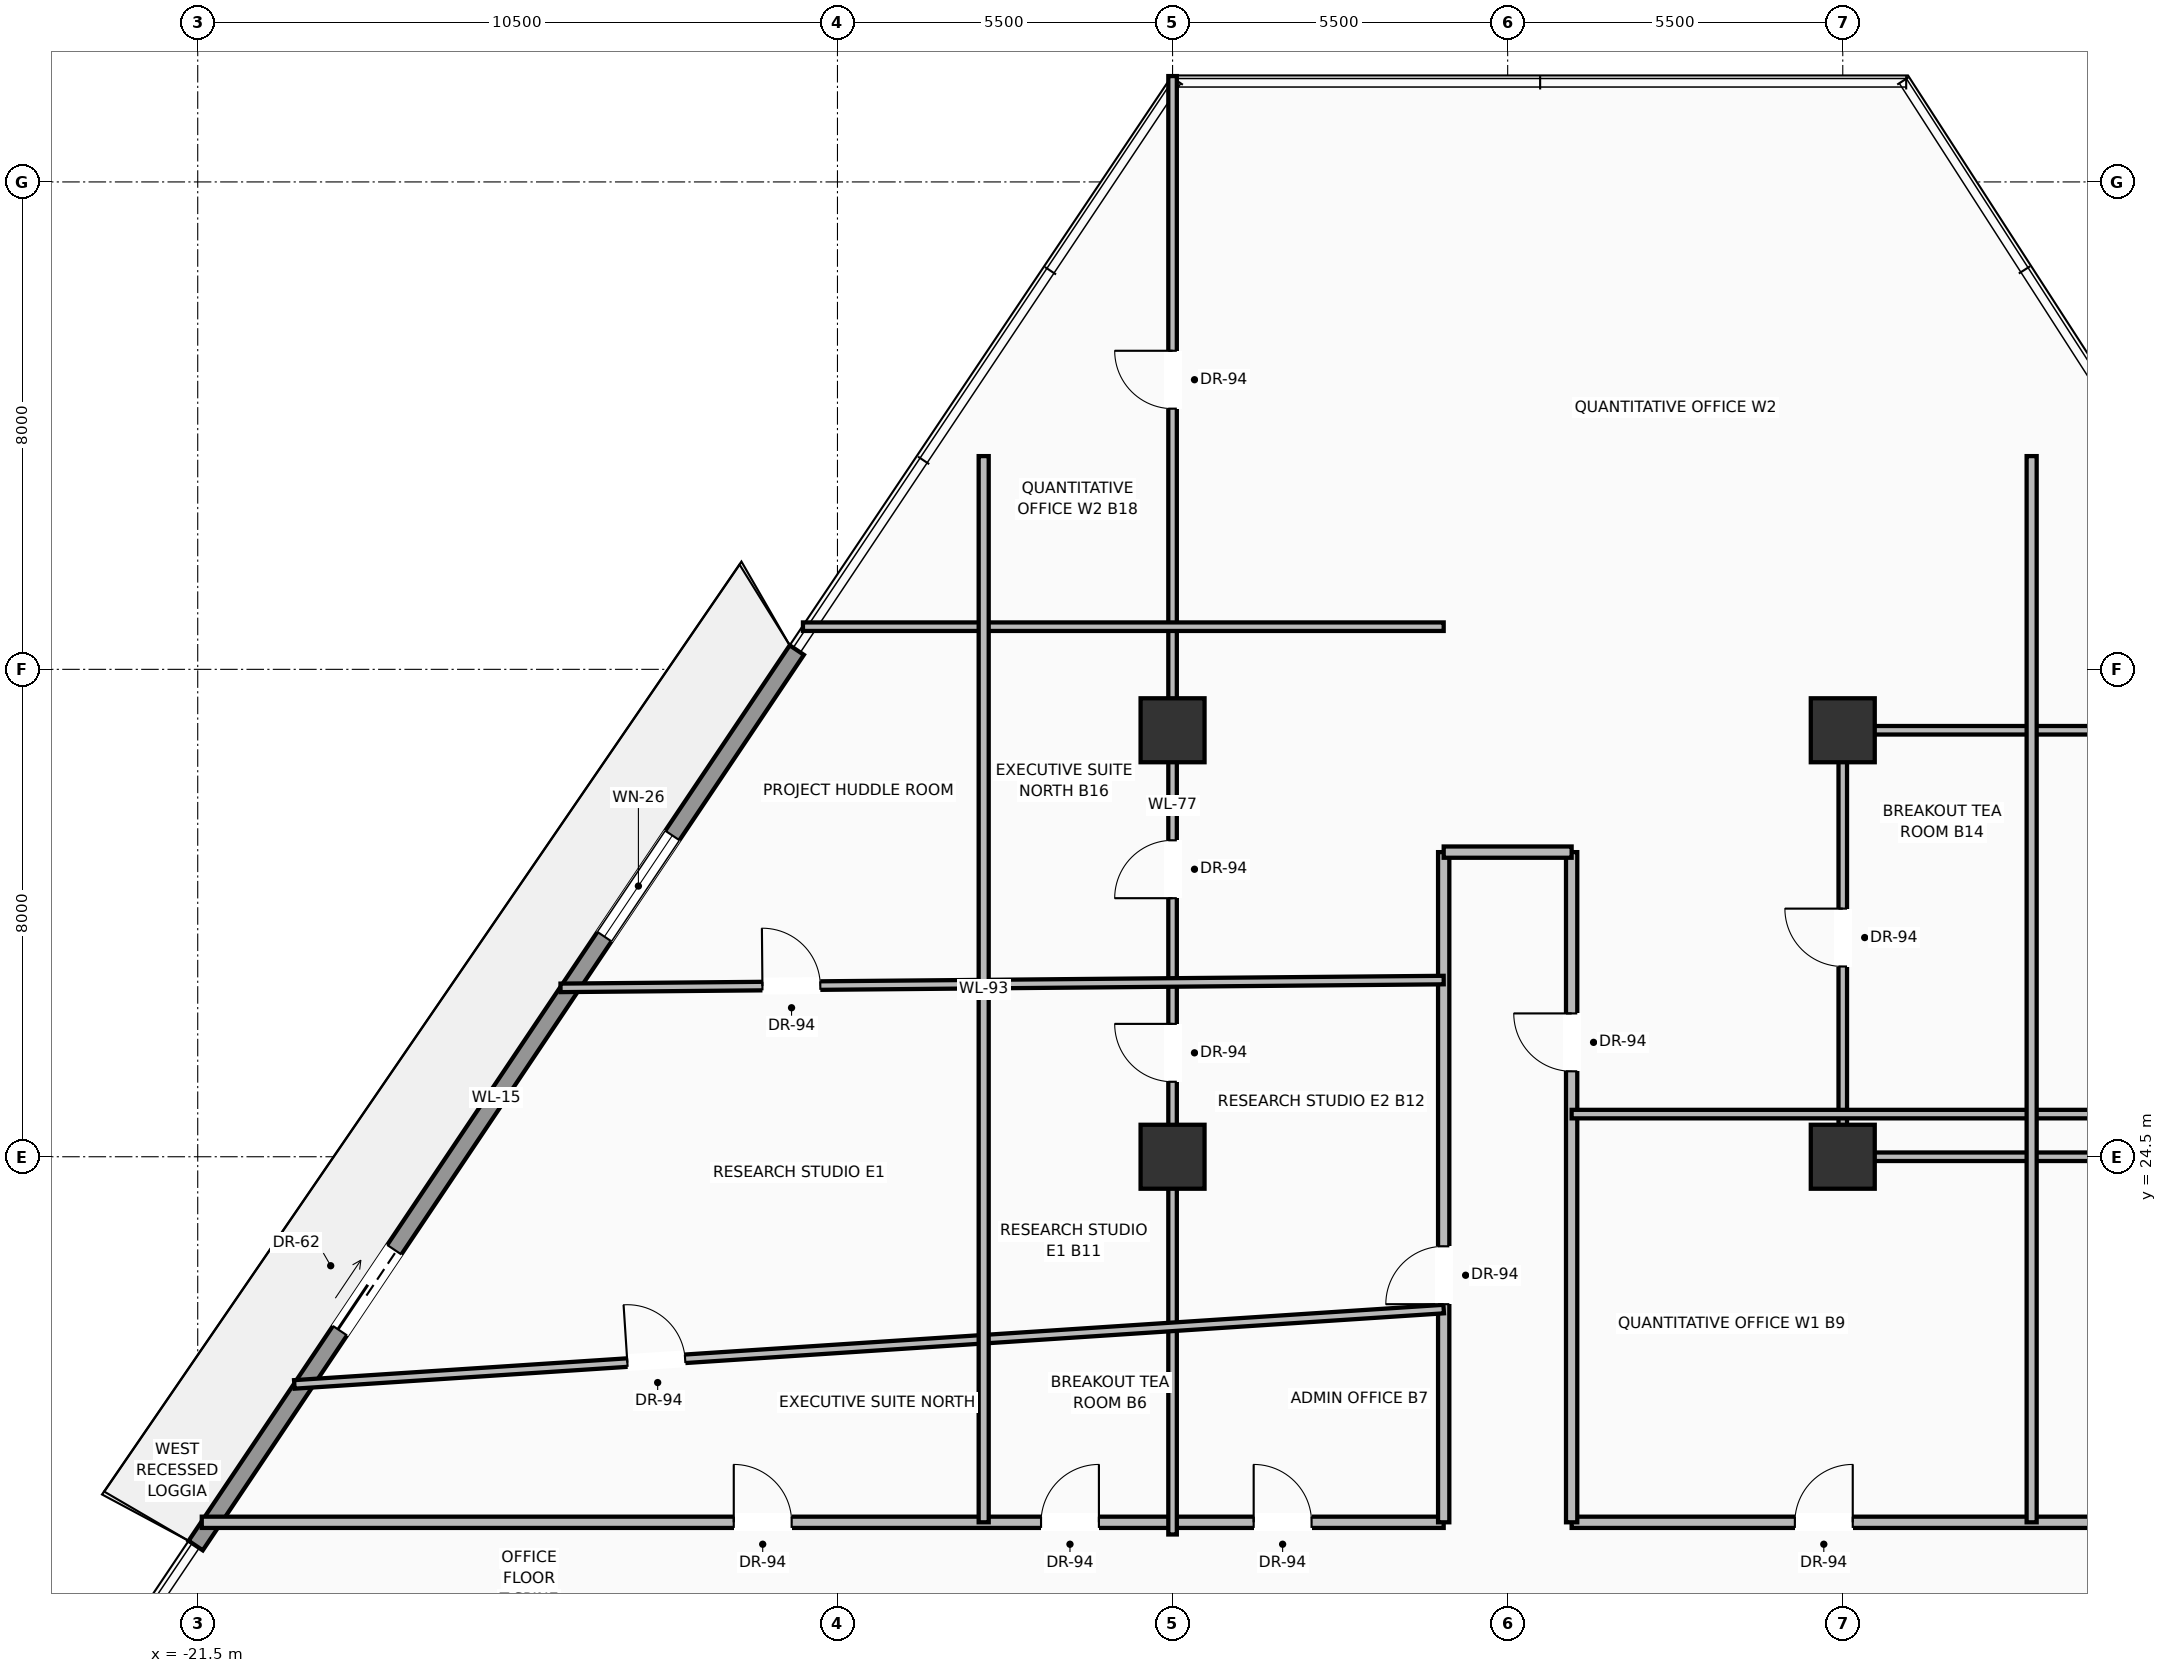
"""IFC4 building model, lengths in metres.
Left out: names, types, materials, properties, quantities, classifications, styles, units other than length and angle.
Written with IfcOpenShell. Run it as: python <this file> out.ifc"""

import sys

from ifc_helpers import new_model, si_unit, direction, frame, frame_2d, origin, origin_2d, place, context, subcontext, project, spatial, rectangle, extrude, source, transform, mapped, element, fill, save


model = new_model("IFC4")
c1 = context("Model", 3, precision=1e-05, world=origin(), true_north=direction((0.0, 1.0)))
c2 = subcontext(c1, "Body", "Model", "MODEL_VIEW")
j1 = project(units=[si_unit("LENGTHUNIT", "METRE"), si_unit("PLANEANGLEUNIT", "RADIAN")], contexts=[c1])
p1 = place(None, origin())
s1 = spatial("IfcSite", under=j1, at=p1, CompositionType="ELEMENT")
p2 = place(p1, origin())
s2 = spatial("IfcBuilding", under=s1, at=p2, CompositionType="ELEMENT")
p3 = place(p2, frame((0.0, 0.0, 98.8)))
s3 = spatial("IfcBuildingStorey", under=s2, at=p3, CompositionType="ELEMENT", Elevation=98.8)
m1 = source(origin(), c2, "Body", "SweptSolid", [
    extrude(rectangle(XDim=1.05, YDim=1.05, at=origin_2d()), origin(), (0.0, 0.0, 1.0), 3.7),
])
for number, where, z_axis, x_axis in (
    (1, (-5.5, 24.5, 0.0), (0.0, 0.0, 1.0), (1.0, 0.0, 0.0)),
    (2, (5.5, 24.5, 0.0), (0.0, 0.0, 1.0), (1.0, 0.0, 0.0)),
    (3, (-5.5, 31.5, 0.0), (0.0, 0.0, 1.0), (1.0, 0.0, 0.0)),
    (4, (5.5, 31.5, 0.0), (0.0, 0.0, 1.0), (1.0, 0.0, 0.0)),
):
    element("IfcColumn", number, at=place(p3, frame(where, z_axis=z_axis, x_axis=x_axis)), inside=s3, PredefinedType="COLUMN", context=c2, shape_type="MappedRepresentation", body=[
        mapped(m1, transform((0.0, 0.0, 0.0), scale=1.0)),
    ])
p4 = place(p3, frame((-21.533, 18.118, 0.0), z_axis=(0.0, 0.0, 1.0), x_axis=(0.55732309921, 0.830295708219, 0.0)))
e5 = element("IfcWall", 5, at=p4, inside=s3, PredefinedType="SOLIDWALL", context=c2, shape_type="SweptSolid", body=[
    extrude(rectangle(XDim=17.702, YDim=0.28, at=frame_2d((8.851, 0.0))), origin(), (0.0, 0.0, 1.0), 3.03),
])
p5 = place(p4, frame((4.249, 0.0, 0.0)))
e6 = element("IfcOpeningElement", 6, at=p5, cuts=e5, PredefinedType="OPENING", context=c2, shape_type="SweptSolid", body=[
    extrude(rectangle(XDim=1.6, YDim=2.35, at=frame_2d((0.8, 1.175))), frame((0.0, 0.15, 0.0), z_axis=(0.0, -1.0, 0.0), x_axis=(1.0, 0.0, 0.0)), (0.0, 0.0, 1.0), 0.3),
])
p6 = place(p4, frame((12.038, 0.0, 0.9)))
e7 = element("IfcOpeningElement", 7, at=p6, cuts=e5, PredefinedType="OPENING", context=c2, shape_type="SweptSolid", body=[
    extrude(rectangle(XDim=2.0, YDim=1.85, at=frame_2d((1.0, 0.925))), frame((0.0, 0.15, 0.0), z_axis=(0.0, -1.0, 0.0), x_axis=(1.0, 0.0, 0.0)), (0.0, 0.0, 1.0), 0.3),
])
p7 = place(p3, frame((-21.434, 18.5, 0.0), z_axis=(0.0, 0.0, 1.0), x_axis=(1.0, 0.0, 0.0)))
e8 = element("IfcWall", 8, at=p7, inside=s3, PredefinedType="PARTITIONING", context=c2, shape_type="SweptSolid", body=[
    extrude(rectangle(XDim=20.384, YDim=0.185, at=frame_2d((10.192, 0.0))), origin(), (0.0, 0.0, 1.0), 2.747),
])
p8 = place(p7, frame((8.732, 0.0, 0.0)))
e9 = element("IfcOpeningElement", 9, at=p8, cuts=e8, PredefinedType="OPENING", context=c2, shape_type="SweptSolid", body=[
    extrude(rectangle(XDim=0.95, YDim=2.2, at=frame_2d((0.475, 1.1))), frame((0.0, 0.103, 0.0), z_axis=(0.0, -1.0, 0.0), x_axis=(1.0, 0.0, 0.0)), (0.0, 0.0, 1.0), 0.205),
])
p9 = place(p7, frame((13.775, 0.0, 0.0)))
e10 = element("IfcOpeningElement", 10, at=p9, cuts=e8, PredefinedType="OPENING", context=c2, shape_type="SweptSolid", body=[
    extrude(rectangle(XDim=0.95, YDim=2.2, at=frame_2d((0.475, 1.1))), frame((0.0, 0.103, 0.0), z_axis=(0.0, -1.0, 0.0), x_axis=(1.0, 0.0, 0.0)), (0.0, 0.0, 1.0), 0.205),
])
p10 = place(p7, frame((17.265, 0.0, 0.0)))
e11 = element("IfcOpeningElement", 11, at=p10, cuts=e8, PredefinedType="OPENING", context=c2, shape_type="SweptSolid", body=[
    extrude(rectangle(XDim=0.95, YDim=2.2, at=frame_2d((0.475, 1.1))), frame((0.0, 0.103, 0.0), z_axis=(0.0, -1.0, 0.0), x_axis=(1.0, 0.0, 0.0)), (0.0, 0.0, 1.0), 0.205),
])
p11 = place(p3, frame((1.05, 18.5, 0.0), z_axis=(0.0, 0.0, 1.0), x_axis=(1.0, 0.0, 0.0)))
e12 = element("IfcWall", 12, at=p11, inside=s3, PredefinedType="PARTITIONING", context=c2, shape_type="SweptSolid", body=[
    extrude(rectangle(XDim=20.85, YDim=0.185, at=frame_2d((10.425, 0.0))), origin(), (0.0, 0.0, 1.0), 2.747),
])
p12 = place(p11, frame((10.959, 0.0, 0.0)))
e13 = element("IfcOpeningElement", 13, at=p12, cuts=e12, PredefinedType="OPENING", context=c2, shape_type="SweptSolid", body=[
    extrude(rectangle(XDim=0.95, YDim=2.2, at=frame_2d((0.475, 1.1))), frame((0.0, 0.103, 0.0), z_axis=(0.0, -1.0, 0.0), x_axis=(1.0, 0.0, 0.0)), (0.0, 0.0, 1.0), 0.205),
])
p13 = place(p11, frame((3.664, 0.0, 0.0)))
e14 = element("IfcOpeningElement", 14, at=p13, cuts=e12, PredefinedType="OPENING", context=c2, shape_type="SweptSolid", body=[
    extrude(rectangle(XDim=0.95, YDim=2.2, at=frame_2d((0.475, 1.1))), frame((0.0, 0.103, 0.0), z_axis=(0.0, -1.0, 0.0), x_axis=(1.0, 0.0, 0.0)), (0.0, 0.0, 1.0), 0.205),
])
p14 = place(p3, frame((-1.05, 18.5, 0.0), z_axis=(0.0, 0.0, 1.0), x_axis=(0.0, 1.0, 0.0)))
e15 = element("IfcWall", 15, at=p14, inside=s3, PredefinedType="PARTITIONING", context=c2, shape_type="SweptSolid", body=[
    extrude(rectangle(XDim=11.0, YDim=0.185, at=frame_2d((5.5, 0.0))), origin(), (0.0, 0.0, 1.0), 2.747),
])
p15 = place(p14, frame((3.58, 0.0, 0.0)))
e16 = element("IfcOpeningElement", 16, at=p15, cuts=e15, PredefinedType="OPENING", context=c2, shape_type="SweptSolid", body=[
    extrude(rectangle(XDim=0.95, YDim=2.2, at=frame_2d((0.475, 1.1))), frame((0.0, 0.103, 0.0), z_axis=(0.0, -1.0, 0.0), x_axis=(1.0, 0.0, 0.0)), (0.0, 0.0, 1.0), 0.205),
])
p16 = place(p3, frame((1.05, 18.5, 0.0), z_axis=(0.0, 0.0, 1.0), x_axis=(0.0, 1.0, 0.0)))
e17 = element("IfcWall", 17, at=p16, inside=s3, PredefinedType="PARTITIONING", context=c2, shape_type="SweptSolid", body=[
    extrude(rectangle(XDim=11.0, YDim=0.185, at=frame_2d((5.5, 0.0))), origin(), (0.0, 0.0, 1.0), 2.747),
])
p17 = place(p16, frame((7.403, 0.0, 0.0)))
e18 = element("IfcOpeningElement", 18, at=p17, cuts=e17, PredefinedType="OPENING", context=c2, shape_type="SweptSolid", body=[
    extrude(rectangle(XDim=0.95, YDim=2.2, at=frame_2d((0.475, 1.1))), frame((0.0, 0.103, 0.0), z_axis=(0.0, -1.0, 0.0), x_axis=(1.0, 0.0, 0.0)), (0.0, 0.0, 1.0), 0.205),
])
p18 = place(p3, frame((-1.05, 29.5, 0.0), z_axis=(0.0, 0.0, 1.0), x_axis=(1.0, 0.0, 0.0)))
e19 = element("IfcWall", 19, at=p18, inside=s3, PredefinedType="PARTITIONING", context=c2, shape_type="SweptSolid", body=[
    extrude(rectangle(XDim=2.1, YDim=0.185, at=frame_2d((1.05, 0.0))), origin(), (0.0, 0.0, 1.0), 3.442),
])
p19 = place(p3, frame((-5.5, 18.3, 0.0), z_axis=(0.0, 0.0, 1.0), x_axis=(0.0, 1.0, 0.0)))
e20 = element("IfcWall", 20, at=p19, inside=s3, PredefinedType="PARTITIONING", context=c2, shape_type="SweptSolid", body=[
    extrude(rectangle(XDim=23.938, YDim=0.14, at=frame_2d((11.969, 0.0))), origin(), (0.0, 0.0, 1.0), 2.747),
])
p20 = place(p19, frame((7.431, 0.0, 0.0)))
e21 = element("IfcOpeningElement", 21, at=p20, cuts=e20, PredefinedType="OPENING", context=c2, shape_type="SweptSolid", body=[
    extrude(rectangle(XDim=0.95, YDim=2.2, at=frame_2d((0.475, 1.1))), frame((0.0, 0.08, 0.0), z_axis=(0.0, -1.0, 0.0), x_axis=(1.0, 0.0, 0.0)), (0.0, 0.0, 1.0), 0.16),
])
p21 = place(p19, frame((10.444, 0.0, 0.0)))
e22 = element("IfcOpeningElement", 22, at=p21, cuts=e20, PredefinedType="OPENING", context=c2, shape_type="SweptSolid", body=[
    extrude(rectangle(XDim=0.95, YDim=2.2, at=frame_2d((0.475, 1.1))), frame((0.0, 0.08, 0.0), z_axis=(0.0, -1.0, 0.0), x_axis=(1.0, 0.0, 0.0)), (0.0, 0.0, 1.0), 0.16),
])
p22 = place(p19, frame((18.479, 0.0, 0.0)))
e23 = element("IfcOpeningElement", 23, at=p22, cuts=e20, PredefinedType="OPENING", context=c2, shape_type="SweptSolid", body=[
    extrude(rectangle(XDim=0.95, YDim=2.2, at=frame_2d((0.475, 1.1))), frame((0.0, 0.08, 0.0), z_axis=(0.0, -1.0, 0.0), x_axis=(1.0, 0.0, 0.0)), (0.0, 0.0, 1.0), 0.16),
])
p23 = place(p3, frame((5.5, 24.5, 0.0), z_axis=(0.0, 0.0, 1.0), x_axis=(1.0, 0.0, 0.0)))
e24 = element("IfcWall", 24, at=p23, inside=s3, PredefinedType="PARTITIONING", context=c2, shape_type="SweptSolid", body=[
    extrude(rectangle(XDim=12.524, YDim=0.14, at=frame_2d((6.262, 0.0))), origin(), (0.0, 0.0, 1.0), 2.747),
])
p24 = place(p3, frame((5.5, 24.5, 0.0), z_axis=(0.0, 0.0, 1.0), x_axis=(0.0, 1.0, 0.0)))
e25 = element("IfcWall", 25, at=p24, inside=s3, PredefinedType="PARTITIONING", context=c2, shape_type="SweptSolid", body=[
    extrude(rectangle(XDim=7.0, YDim=0.14, at=frame_2d((3.5, 0.0))), origin(), (0.0, 0.0, 1.0), 2.747),
])
p25 = place(p24, frame((3.123, 0.0, 0.0)))
e26 = element("IfcOpeningElement", 26, at=p25, cuts=e25, PredefinedType="OPENING", context=c2, shape_type="SweptSolid", body=[
    extrude(rectangle(XDim=0.95, YDim=2.2, at=frame_2d((0.475, 1.1))), frame((0.0, 0.08, 0.0), z_axis=(0.0, -1.0, 0.0), x_axis=(1.0, 0.0, 0.0)), (0.0, 0.0, 1.0), 0.16),
])
p26 = place(p3, frame((5.5, 31.5, 0.0), z_axis=(0.0, 0.0, 1.0), x_axis=(1.0, 0.0, 0.0)))
e27 = element("IfcWall", 27, at=p26, inside=s3, PredefinedType="PARTITIONING", context=c2, shape_type="SweptSolid", body=[
    extrude(rectangle(XDim=8.002, YDim=0.14, at=frame_2d((4.001, 0.0))), origin(), (0.0, 0.0, 1.0), 2.747),
])
p27 = place(p26, frame((4.815, 0.0, 0.0)))
e28 = element("IfcOpeningElement", 28, at=p27, cuts=e27, PredefinedType="OPENING", context=c2, shape_type="SweptSolid", body=[
    extrude(rectangle(XDim=0.95, YDim=2.2, at=frame_2d((0.475, 1.1))), frame((0.0, 0.08, 0.0), z_axis=(0.0, -1.0, 0.0), x_axis=(1.0, 0.0, 0.0)), (0.0, 0.0, 1.0), 0.16),
])
p28 = place(p3, frame((-19.914, 20.763, 0.0), z_axis=(0.0, 0.0, 1.0), x_axis=(0.997857584866, 0.065423545645, 0.0)))
e29 = element("IfcWall", 29, at=p28, inside=s3, PredefinedType="PARTITIONING", context=c2, shape_type="SweptSolid", body=[
    extrude(rectangle(XDim=18.905, YDim=0.14, at=frame_2d((9.452, 0.0))), origin(), (0.0, 0.0, 1.0), 2.747),
])
p29 = place(p28, frame((5.478, 0.0, 0.0)))
e30 = element("IfcOpeningElement", 30, at=p29, cuts=e29, PredefinedType="OPENING", context=c2, shape_type="SweptSolid", body=[
    extrude(rectangle(XDim=0.95, YDim=2.2, at=frame_2d((0.475, 1.1))), frame((0.0, 0.08, 0.0), z_axis=(0.0, -1.0, 0.0), x_axis=(1.0, 0.0, 0.0)), (0.0, 0.0, 1.0), 0.16),
])
p30 = place(p3, frame((-15.545, 27.272, 0.0), z_axis=(0.0, 0.0, 1.0), x_axis=(0.999961057016, 0.008825216746, 0.0)))
e31 = element("IfcWall", 31, at=p30, inside=s3, PredefinedType="PARTITIONING", context=c2, shape_type="SweptSolid", body=[
    extrude(rectangle(XDim=14.496, YDim=0.14, at=frame_2d((7.248, 0.0))), origin(), (0.0, 0.0, 1.0), 2.747),
])
p31 = place(p30, frame((3.314, 0.0, 0.0)))
e32 = element("IfcOpeningElement", 32, at=p31, cuts=e31, PredefinedType="OPENING", context=c2, shape_type="SweptSolid", body=[
    extrude(rectangle(XDim=0.95, YDim=2.2, at=frame_2d((0.475, 1.1))), frame((0.0, 0.08, 0.0), z_axis=(0.0, -1.0, 0.0), x_axis=(1.0, 0.0, 0.0)), (0.0, 0.0, 1.0), 0.16),
])
p32 = place(p3, frame((-11.566, 33.2, 0.0), z_axis=(0.0, 0.0, 1.0), x_axis=(1.0, 0.0, 0.0)))
e33 = element("IfcWall", 33, at=p32, inside=s3, PredefinedType="PARTITIONING", context=c2, shape_type="SweptSolid", body=[
    extrude(rectangle(XDim=10.516, YDim=0.14, at=frame_2d((5.258, 0.0))), origin(), (0.0, 0.0, 1.0), 2.747),
])
p33 = place(p3, frame((1.05, 25.2, 0.0), z_axis=(0.0, 0.0, 1.0), x_axis=(1.0, 0.0, 0.0)))
e34 = element("IfcWall", 34, at=p33, inside=s3, PredefinedType="PARTITIONING", context=c2, shape_type="SweptSolid", body=[
    extrude(rectangle(XDim=16.522, YDim=0.14, at=frame_2d((8.261, 0.0))), origin(), (0.0, 0.0, 1.0), 2.747),
])
for number, where, z_axis, x_axis in (
    (35, (-8.6, 18.5, 0.0), (0.0, 0.0, 1.0), (0.0, 1.0, 0.0)),
    (36, (8.6, 18.5, 0.0), (0.0, 0.0, 1.0), (0.0, 1.0, 0.0)),
):
    element("IfcWall", number, at=place(p3, frame(where, z_axis=z_axis, x_axis=x_axis)), inside=s3, PredefinedType="PARTITIONING", context=c2, shape_type="SweptSolid", body=[
        extrude(rectangle(XDim=17.5, YDim=0.165, at=frame_2d((8.75, 0.0))), origin(), (0.0, 0.0, 1.0), 2.747),
    ])
m2 = source(origin(), c2, "Body", "SweptSolid", [
    extrude(rectangle(XDim=1.6, YDim=2.35, at=frame_2d((0.8, 1.175))), frame((0.0, 0.025, 0.0), z_axis=(0.0, -1.0, 0.0), x_axis=(1.0, 0.0, 0.0)), (0.0, 0.0, 1.0), 0.05),
])
p34 = place(p5, origin())
e37 = element("IfcDoor", 37, at=p34, inside=s3, OperationType="SLIDING_TO_LEFT", PredefinedType="DOOR", context=c2, shape_type="MappedRepresentation", body=[
    mapped(m2, transform((0.0, 0.0, 0.0), scale=1.0)),
])
fill(e6, e37)
m3 = source(origin(), c2, "Body", "SweptSolid", [
    extrude(rectangle(XDim=2.0, YDim=1.85, at=frame_2d((1.0, 0.925))), frame((0.0, 0.03, 0.0), z_axis=(0.0, -1.0, 0.0), x_axis=(1.0, 0.0, 0.0)), (0.0, 0.0, 1.0), 0.06),
])
p35 = place(p6, origin())
e38 = element("IfcWindow", 38, at=p35, inside=s3, PartitioningType="SINGLE_PANEL", PredefinedType="WINDOW", context=c2, shape_type="MappedRepresentation", body=[
    mapped(m3, transform((0.0, 0.0, 0.0), scale=1.0)),
])
fill(e7, e38)
m4 = source(origin(), c2, "Body", "SweptSolid", [
    extrude(rectangle(XDim=0.95, YDim=2.2, at=frame_2d((0.475, 1.1))), frame((0.0, 0.025, 0.0), z_axis=(0.0, -1.0, 0.0), x_axis=(1.0, 0.0, 0.0)), (0.0, 0.0, 1.0), 0.05),
])
p36 = place(p8, origin())
e39 = element("IfcDoor", 39, at=p36, inside=s3, OperationType="SINGLE_SWING_LEFT", PredefinedType="DOOR", context=c2, shape_type="MappedRepresentation", body=[
    mapped(m4, transform((0.0, 0.0, 0.0), scale=1.0)),
])
fill(e9, e39)
p37 = place(p15, origin())
e40 = element("IfcDoor", 40, at=p37, inside=s3, OperationType="SINGLE_SWING_LEFT", PredefinedType="DOOR", context=c2, shape_type="MappedRepresentation", body=[
    mapped(m4, transform((0.0, 0.0, 0.0), scale=1.0)),
])
fill(e16, e40)
p38 = place(p17, origin())
e41 = element("IfcDoor", 41, at=p38, inside=s3, OperationType="SINGLE_SWING_RIGHT", PredefinedType="DOOR", context=c2, shape_type="MappedRepresentation", body=[
    mapped(m4, transform((0.0, 0.0, 0.0), scale=1.0)),
])
fill(e18, e41)
p39 = place(p9, origin())
e42 = element("IfcDoor", 42, at=p39, inside=s3, OperationType="SINGLE_SWING_RIGHT", PredefinedType="DOOR", context=c2, shape_type="MappedRepresentation", body=[
    mapped(m4, transform((0.0, 0.0, 0.0), scale=1.0)),
])
fill(e10, e42)
p40 = place(p10, origin())
e43 = element("IfcDoor", 43, at=p40, inside=s3, OperationType="SINGLE_SWING_LEFT", PredefinedType="DOOR", context=c2, shape_type="MappedRepresentation", body=[
    mapped(m4, transform((0.0, 0.0, 0.0), scale=1.0)),
])
fill(e11, e43)
p41 = place(p13, origin())
e44 = element("IfcDoor", 44, at=p41, inside=s3, OperationType="SINGLE_SWING_RIGHT", PredefinedType="DOOR", context=c2, shape_type="MappedRepresentation", body=[
    mapped(m4, transform((0.0, 0.0, 0.0), scale=1.0)),
])
fill(e14, e44)
p42 = place(p29, origin())
e45 = element("IfcDoor", 45, at=p42, inside=s3, OperationType="SINGLE_SWING_LEFT", PredefinedType="DOOR", context=c2, shape_type="MappedRepresentation", body=[
    mapped(m4, transform((0.0, 0.0, 0.0), scale=1.0)),
])
fill(e30, e45)
p43 = place(p20, origin())
e46 = element("IfcDoor", 46, at=p43, inside=s3, OperationType="SINGLE_SWING_RIGHT", PredefinedType="DOOR", context=c2, shape_type="MappedRepresentation", body=[
    mapped(m4, transform((0.0, 0.0, 0.0), scale=1.0)),
])
fill(e21, e46)
p44 = place(p25, origin())
e47 = element("IfcDoor", 47, at=p44, inside=s3, OperationType="SINGLE_SWING_RIGHT", PredefinedType="DOOR", context=c2, shape_type="MappedRepresentation", body=[
    mapped(m4, transform((0.0, 0.0, 0.0), scale=1.0)),
])
fill(e26, e47)
p45 = place(p21, origin())
e48 = element("IfcDoor", 48, at=p45, inside=s3, OperationType="SINGLE_SWING_LEFT", PredefinedType="DOOR", context=c2, shape_type="MappedRepresentation", body=[
    mapped(m4, transform((0.0, 0.0, 0.0), scale=1.0)),
])
fill(e22, e48)
p46 = place(p22, origin())
e49 = element("IfcDoor", 49, at=p46, inside=s3, OperationType="SINGLE_SWING_RIGHT", PredefinedType="DOOR", context=c2, shape_type="MappedRepresentation", body=[
    mapped(m4, transform((0.0, 0.0, 0.0), scale=1.0)),
])
fill(e23, e49)
p47 = place(p31, origin())
e50 = element("IfcDoor", 50, at=p47, inside=s3, OperationType="SINGLE_SWING_LEFT", PredefinedType="DOOR", context=c2, shape_type="MappedRepresentation", body=[
    mapped(m4, transform((0.0, 0.0, 0.0), scale=1.0)),
])
fill(e32, e50)
save(model, sys.argv[1])
